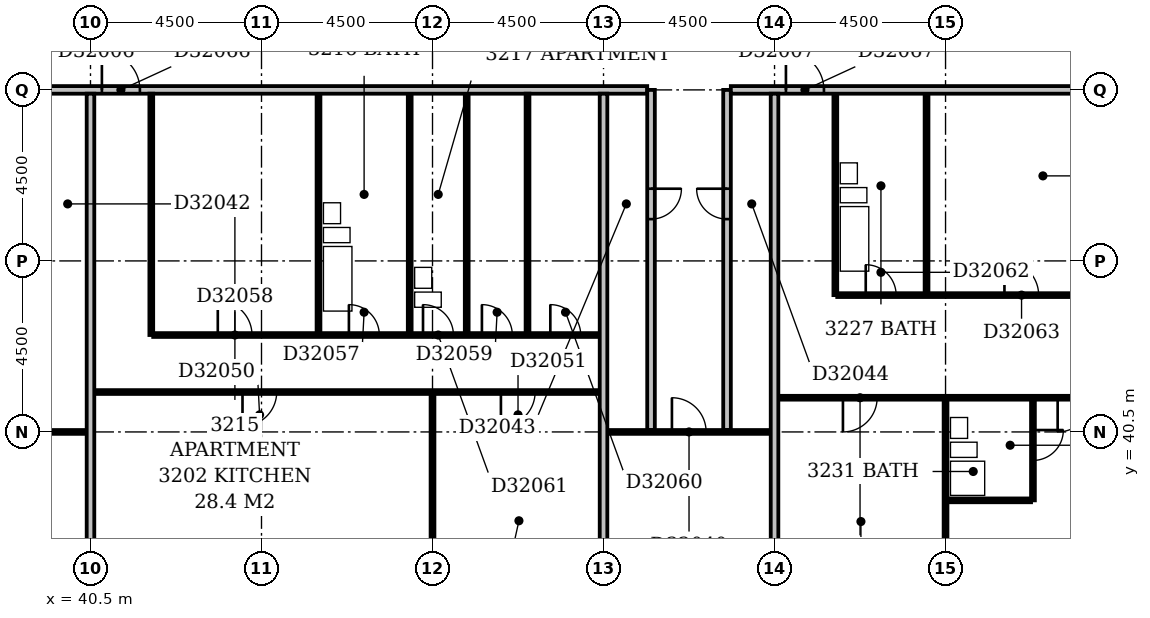
"""IFC4 building model, lengths in metres.
Left out: names, types, materials, properties, quantities, classifications, styles, units other than length and angle.
Written with IfcOpenShell. Run it as: python <this file> out.ifc"""

import sys

from ifc_helpers import new_model, si_unit, direction, frame, frame_2d, origin, place, context, subcontext, project, spatial, rectangle, extrude, element, fill, save


model = new_model("IFC4")
c1 = context("Model", 3, precision=1e-05, world=origin(), true_north=direction((0.0, 1.0)))
c2 = subcontext(c1, "Body", "Model", "MODEL_VIEW")
j1 = project(units=[si_unit("LENGTHUNIT", "METRE"), si_unit("PLANEANGLEUNIT", "RADIAN")], contexts=[c1])
p1 = place(None, origin())
s1 = spatial("IfcSite", under=j1, at=p1, CompositionType="ELEMENT")
p2 = place(p1, origin())
s2 = spatial("IfcBuilding", under=s1, at=p2, CompositionType="ELEMENT")
p3 = place(p2, frame((0.0, 0.0, 130.4)))
s3 = spatial("IfcBuildingStorey", under=s2, at=p3, CompositionType="ELEMENT", Elevation=130.4)
p4 = place(p3, frame((40.5, 36.5, 0.0), z_axis=(0.0, 0.0, 1.0), x_axis=(0.0, 1.0, 0.0)))
e1 = element("IfcWall", 1, at=p4, inside=s3, PredefinedType="PARTITIONING", context=c2, shape_type="SweptSolid", body=[
    extrude(rectangle(XDim=12.9, YDim=0.2, at=frame_2d((6.45, 0.0))), origin(), (0.0, 0.0, 1.0), 3.3),
])
p5 = place(p3, frame((49.5, 36.5, 0.0), z_axis=(0.0, 0.0, 1.0), x_axis=(0.0, 1.0, 0.0)))
e2 = element("IfcWall", 2, at=p5, inside=s3, PredefinedType="PARTITIONING", context=c2, shape_type="SweptSolid", body=[
    extrude(rectangle(XDim=5.0, YDim=0.1, at=frame_2d((2.5, 0.0))), origin(), (0.0, 0.0, 1.0), 3.3),
])
p6 = place(p3, frame((54.0, 36.5, 0.0), z_axis=(0.0, 0.0, 1.0), x_axis=(0.0, 1.0, 0.0)))
e3 = element("IfcWall", 3, at=p6, inside=s3, PredefinedType="PARTITIONING", context=c2, shape_type="SweptSolid", body=[
    extrude(rectangle(XDim=12.9, YDim=0.2, at=frame_2d((6.45, 0.0))), origin(), (0.0, 0.0, 1.0), 2.6),
])
p7 = place(p3, frame((58.5, 36.5, 0.0), z_axis=(0.0, 0.0, 1.0), x_axis=(0.0, 1.0, 0.0)))
e4 = element("IfcWall", 4, at=p7, inside=s3, PredefinedType="PARTITIONING", context=c2, shape_type="SweptSolid", body=[
    extrude(rectangle(XDim=12.9, YDim=0.2, at=frame_2d((6.45, 0.0))), origin(), (0.0, 0.0, 1.0), 3.3),
])
p8 = place(p3, frame((63.0, 36.5, 0.0), z_axis=(0.0, 0.0, 1.0), x_axis=(0.0, 1.0, 0.0)))
e5 = element("IfcWall", 5, at=p8, inside=s3, PredefinedType="PARTITIONING", context=c2, shape_type="SweptSolid", body=[
    extrude(rectangle(XDim=4.85, YDim=0.1, at=frame_2d((2.425, 0.0))), origin(), (0.0, 0.0, 1.0), 2.4),
])
p9 = place(p3, frame((63.05, 38.7, 0.0), z_axis=(0.0, 0.0, 1.0), x_axis=(1.0, 0.0, 0.0)))
e6 = element("IfcWall", 6, at=p9, inside=s3, PredefinedType="PLUMBINGWALL", context=c2, shape_type="SweptSolid", body=[
    extrude(rectangle(XDim=2.2, YDim=0.1, at=frame_2d((1.1, 0.0))), origin(), (0.0, 0.0, 1.0), 3.3),
])
p10 = place(p3, frame((65.3, 38.7, 0.0), z_axis=(0.0, 0.0, 1.0), x_axis=(0.0, 1.0, 0.0)))
e7 = element("IfcWall", 7, at=p10, inside=s3, PredefinedType="PLUMBINGWALL", context=c2, shape_type="SweptSolid", body=[
    extrude(rectangle(XDim=2.65, YDim=0.1, at=frame_2d((1.325, 0.0))), origin(), (0.0, 0.0, 1.0), 3.3),
])
p11 = place(p10, frame((1.05, 0.0, 0.0)))
e8 = element("IfcOpeningElement", 8, at=p11, cuts=e7, PredefinedType="OPENING", context=c2, shape_type="SweptSolid", body=[
    extrude(rectangle(XDim=0.8, YDim=2.1, at=frame_2d((0.4, 1.05))), frame((0.0, 0.062, 0.0), z_axis=(0.0, -1.0, 0.0), x_axis=(1.0, 0.0, 0.0)), (0.0, 0.0, 1.0), 0.124),
])
p12 = place(p3, frame((36.1, 40.5, 0.0), z_axis=(0.0, 0.0, 1.0), x_axis=(1.0, 0.0, 0.0)))
e9 = element("IfcWall", 9, at=p12, inside=s3, PredefinedType="PARTITIONING", context=c2, shape_type="SweptSolid", body=[
    extrude(rectangle(XDim=4.3, YDim=0.1, at=frame_2d((2.15, 0.0))), origin(), (0.0, 0.0, 1.0), 3.3),
])
p13 = place(p12, frame((1.7, 0.0, 0.0)))
e10 = element("IfcOpeningElement", 10, at=p13, cuts=e9, PredefinedType="OPENING", context=c2, shape_type="SweptSolid", body=[
    extrude(rectangle(XDim=0.9, YDim=2.1, at=frame_2d((0.45, 1.05))), frame((0.0, 0.062, 0.0), z_axis=(0.0, -1.0, 0.0), x_axis=(1.0, 0.0, 0.0)), (0.0, 0.0, 1.0), 0.124),
])
p14 = place(p3, frame((54.1, 40.5, 0.0), z_axis=(0.0, 0.0, 1.0), x_axis=(1.0, 0.0, 0.0)))
e11 = element("IfcWall", 11, at=p14, inside=s3, PredefinedType="PARTITIONING", context=c2, shape_type="SweptSolid", body=[
    extrude(rectangle(XDim=4.3, YDim=0.1, at=frame_2d((2.15, 0.0))), origin(), (0.0, 0.0, 1.0), 3.3),
])
p15 = place(p14, frame((1.7, 0.0, 0.0)))
e12 = element("IfcOpeningElement", 12, at=p15, cuts=e11, PredefinedType="OPENING", context=c2, shape_type="SweptSolid", body=[
    extrude(rectangle(XDim=0.9, YDim=2.1, at=frame_2d((0.45, 1.05))), frame((0.0, 0.062, 0.0), z_axis=(0.0, -1.0, 0.0), x_axis=(1.0, 0.0, 0.0)), (0.0, 0.0, 1.0), 0.124),
])
p16 = place(p3, frame((55.25, 40.55, 0.0), z_axis=(0.0, 0.0, 1.0), x_axis=(0.0, 1.0, 0.0)))
e13 = element("IfcWall", 13, at=p16, inside=s3, PredefinedType="PARTITIONING", context=c2, shape_type="SweptSolid", body=[
    extrude(rectangle(XDim=8.95, YDim=0.2, at=frame_2d((4.475, 0.0))), origin(), (0.0, 0.0, 1.0), 3.3),
])
p17 = place(p16, frame((5.55, 0.0, 0.0)))
e14 = element("IfcOpeningElement", 14, at=p17, cuts=e13, PredefinedType="OPENING", context=c2, shape_type="SweptSolid", body=[
    extrude(rectangle(XDim=0.8, YDim=2.1, at=frame_2d((0.4, 1.05))), frame((0.0, 0.112, 0.0), z_axis=(0.0, -1.0, 0.0), x_axis=(1.0, 0.0, 0.0)), (0.0, 0.0, 1.0), 0.224),
])
p18 = place(p3, frame((57.25, 40.55, 0.0), z_axis=(0.0, 0.0, 1.0), x_axis=(0.0, 1.0, 0.0)))
e15 = element("IfcWall", 15, at=p18, inside=s3, PredefinedType="PARTITIONING", context=c2, shape_type="SweptSolid", body=[
    extrude(rectangle(XDim=8.95, YDim=0.2, at=frame_2d((4.475, 0.0))), origin(), (0.0, 0.0, 1.0), 3.3),
])
p19 = place(p18, frame((5.55, 0.0, 0.0)))
e16 = element("IfcOpeningElement", 16, at=p19, cuts=e15, PredefinedType="OPENING", context=c2, shape_type="SweptSolid", body=[
    extrude(rectangle(XDim=0.8, YDim=2.1, at=frame_2d((0.4, 1.05))), frame((0.0, 0.112, 0.0), z_axis=(0.0, -1.0, 0.0), x_axis=(1.0, 0.0, 0.0)), (0.0, 0.0, 1.0), 0.224),
])
p20 = place(p3, frame((58.6, 41.4, 0.0), z_axis=(0.0, 0.0, 1.0), x_axis=(1.0, 0.0, 0.0)))
e17 = element("IfcWall", 17, at=p20, inside=s3, PredefinedType="PARTITIONING", context=c2, shape_type="SweptSolid", body=[
    extrude(rectangle(XDim=9.5, YDim=0.1, at=frame_2d((4.75, 0.0))), origin(), (0.0, 0.0, 1.0), 3.3),
])
p21 = place(p20, frame((1.7, 0.0, 0.0)))
e18 = element("IfcOpeningElement", 18, at=p21, cuts=e17, PredefinedType="OPENING", context=c2, shape_type="SweptSolid", body=[
    extrude(rectangle(XDim=0.9, YDim=2.1, at=frame_2d((0.45, 1.05))), frame((0.0, 0.062, 0.0), z_axis=(0.0, -1.0, 0.0), x_axis=(1.0, 0.0, 0.0)), (0.0, 0.0, 1.0), 0.124),
])
p22 = place(p20, frame((7.35, 0.0, 0.0)))
e19 = element("IfcOpeningElement", 19, at=p22, cuts=e17, PredefinedType="OPENING", context=c2, shape_type="SweptSolid", body=[
    extrude(rectangle(XDim=0.9, YDim=2.1, at=frame_2d((0.45, 1.05))), frame((0.0, 0.062, 0.0), z_axis=(0.0, -1.0, 0.0), x_axis=(1.0, 0.0, 0.0)), (0.0, 0.0, 1.0), 0.124),
])
p23 = place(p3, frame((40.6, 41.55, 0.0), z_axis=(0.0, 0.0, 1.0), x_axis=(1.0, 0.0, 0.0)))
e20 = element("IfcWall", 20, at=p23, inside=s3, PredefinedType="PARTITIONING", context=c2, shape_type="SweptSolid", body=[
    extrude(rectangle(XDim=13.3, YDim=0.1, at=frame_2d((6.65, 0.0))), origin(), (0.0, 0.0, 1.0), 3.3),
])
p24 = place(p23, frame((3.9, 0.0, 0.0)))
e21 = element("IfcOpeningElement", 21, at=p24, cuts=e20, PredefinedType="OPENING", context=c2, shape_type="SweptSolid", body=[
    extrude(rectangle(XDim=0.9, YDim=2.1, at=frame_2d((0.45, 1.05))), frame((0.0, 0.062, 0.0), z_axis=(0.0, -1.0, 0.0), x_axis=(1.0, 0.0, 0.0)), (0.0, 0.0, 1.0), 0.124),
])
p25 = place(p23, frame((10.7, 0.0, 0.0)))
e22 = element("IfcOpeningElement", 22, at=p25, cuts=e20, PredefinedType="OPENING", context=c2, shape_type="SweptSolid", body=[
    extrude(rectangle(XDim=0.9, YDim=2.1, at=frame_2d((0.45, 1.05))), frame((0.0, 0.062, 0.0), z_axis=(0.0, -1.0, 0.0), x_axis=(1.0, 0.0, 0.0)), (0.0, 0.0, 1.0), 0.124),
])
p26 = place(p3, frame((42.1, 43.05, 0.0), z_axis=(0.0, 0.0, 1.0), x_axis=(0.0, 1.0, 0.0)))
e23 = element("IfcWall", 23, at=p26, inside=s3, PredefinedType="PARTITIONING", context=c2, shape_type="SweptSolid", body=[
    extrude(rectangle(XDim=6.35, YDim=0.1, at=frame_2d((3.175, 0.0))), origin(), (0.0, 0.0, 1.0), 3.3),
])
p27 = place(p3, frame((42.15, 43.05, 0.0), z_axis=(0.0, 0.0, 1.0), x_axis=(1.0, 0.0, 0.0)))
e24 = element("IfcWall", 24, at=p27, inside=s3, PredefinedType="PARTITIONING", context=c2, shape_type="SweptSolid", body=[
    extrude(rectangle(XDim=11.75, YDim=0.1, at=frame_2d((5.875, 0.0))), origin(), (0.0, 0.0, 1.0), 3.3),
])
p28 = place(p27, frame((5.15, 0.0, 0.0)))
e25 = element("IfcOpeningElement", 25, at=p28, cuts=e24, PredefinedType="OPENING", context=c2, shape_type="SweptSolid", body=[
    extrude(rectangle(XDim=0.8, YDim=2.1, at=frame_2d((0.4, 1.05))), frame((0.0, 0.062, 0.0), z_axis=(0.0, -1.0, 0.0), x_axis=(1.0, 0.0, 0.0)), (0.0, 0.0, 1.0), 0.124),
])
p29 = place(p27, frame((1.7, 0.0, 0.0)))
e26 = element("IfcOpeningElement", 26, at=p29, cuts=e24, PredefinedType="OPENING", context=c2, shape_type="SweptSolid", body=[
    extrude(rectangle(XDim=0.9, YDim=2.1, at=frame_2d((0.45, 1.05))), frame((0.0, 0.062, 0.0), z_axis=(0.0, -1.0, 0.0), x_axis=(1.0, 0.0, 0.0)), (0.0, 0.0, 1.0), 0.124),
])
p30 = place(p27, frame((8.65, 0.0, 0.0)))
e27 = element("IfcOpeningElement", 27, at=p30, cuts=e24, PredefinedType="OPENING", context=c2, shape_type="SweptSolid", body=[
    extrude(rectangle(XDim=0.8, YDim=2.1, at=frame_2d((0.4, 1.05))), frame((0.0, 0.062, 0.0), z_axis=(0.0, -1.0, 0.0), x_axis=(1.0, 0.0, 0.0)), (0.0, 0.0, 1.0), 0.124),
])
p31 = place(p27, frame((10.45, 0.0, 0.0)))
e28 = element("IfcOpeningElement", 28, at=p31, cuts=e24, PredefinedType="OPENING", context=c2, shape_type="SweptSolid", body=[
    extrude(rectangle(XDim=0.8, YDim=2.1, at=frame_2d((0.4, 1.05))), frame((0.0, 0.062, 0.0), z_axis=(0.0, -1.0, 0.0), x_axis=(1.0, 0.0, 0.0)), (0.0, 0.0, 1.0), 0.124),
])
p32 = place(p27, frame((7.1, 0.0, 0.0)))
e29 = element("IfcOpeningElement", 29, at=p32, cuts=e24, PredefinedType="OPENING", context=c2, shape_type="SweptSolid", body=[
    extrude(rectangle(XDim=0.8, YDim=2.1, at=frame_2d((0.4, 1.05))), frame((0.0, 0.062, 0.0), z_axis=(0.0, -1.0, 0.0), x_axis=(1.0, 0.0, 0.0)), (0.0, 0.0, 1.0), 0.124),
])
for number, where, z_axis, x_axis in (
    (30, (46.5, 43.1, 0.0), (0.0, 0.0, 1.0), (0.0, 1.0, 0.0)),
    (31, (48.9, 43.1, 0.0), (0.0, 0.0, 1.0), (0.0, 1.0, 0.0)),
    (32, (50.4, 43.1, 0.0), (0.0, 0.0, 1.0), (0.0, 1.0, 0.0)),
):
    element("IfcWall", number, at=place(p3, frame(where, z_axis=z_axis, x_axis=x_axis)), inside=s3, PredefinedType="PLUMBINGWALL", context=c2, shape_type="SweptSolid", body=[
        extrude(rectangle(XDim=6.3, YDim=0.1, at=frame_2d((3.15, 0.0))), origin(), (0.0, 0.0, 1.0), 3.3),
    ])
p33 = place(p3, frame((52.0, 43.1, 0.0), z_axis=(0.0, 0.0, 1.0), x_axis=(0.0, 1.0, 0.0)))
e33 = element("IfcWall", 33, at=p33, inside=s3, PredefinedType="PARTITIONING", context=c2, shape_type="SweptSolid", body=[
    extrude(rectangle(XDim=6.3, YDim=0.1, at=frame_2d((3.15, 0.0))), origin(), (0.0, 0.0, 1.0), 3.3),
])
p34 = place(p3, frame((60.1, 44.1, 0.0), z_axis=(0.0, 0.0, 1.0), x_axis=(0.0, 1.0, 0.0)))
e34 = element("IfcWall", 34, at=p34, inside=s3, PredefinedType="PLUMBINGWALL", context=c2, shape_type="SweptSolid", body=[
    extrude(rectangle(XDim=5.3, YDim=0.1, at=frame_2d((2.65, 0.0))), origin(), (0.0, 0.0, 1.0), 3.3),
])
p35 = place(p3, frame((60.15, 44.1, 0.0), z_axis=(0.0, 0.0, 1.0), x_axis=(1.0, 0.0, 0.0)))
e35 = element("IfcWall", 35, at=p35, inside=s3, PredefinedType="PARTITIONING", context=c2, shape_type="SweptSolid", body=[
    extrude(rectangle(XDim=7.95, YDim=0.1, at=frame_2d((3.975, 0.0))), origin(), (0.0, 0.0, 1.0), 3.3),
])
p36 = place(p35, frame((0.75, 0.0, 0.0)))
e36 = element("IfcOpeningElement", 36, at=p36, cuts=e35, PredefinedType="OPENING", context=c2, shape_type="SweptSolid", body=[
    extrude(rectangle(XDim=0.8, YDim=2.1, at=frame_2d((0.4, 1.05))), frame((0.0, 0.062, 0.0), z_axis=(0.0, -1.0, 0.0), x_axis=(1.0, 0.0, 0.0)), (0.0, 0.0, 1.0), 0.124),
])
p37 = place(p35, frame((4.4, 0.0, 0.0)))
e37 = element("IfcOpeningElement", 37, at=p37, cuts=e35, PredefinedType="OPENING", context=c2, shape_type="SweptSolid", body=[
    extrude(rectangle(XDim=0.9, YDim=2.1, at=frame_2d((0.45, 1.05))), frame((0.0, 0.062, 0.0), z_axis=(0.0, -1.0, 0.0), x_axis=(1.0, 0.0, 0.0)), (0.0, 0.0, 1.0), 0.124),
])
p38 = place(p3, frame((62.5, 44.15, 0.0), z_axis=(0.0, 0.0, 1.0), x_axis=(0.0, 1.0, 0.0)))
e38 = element("IfcWall", 38, at=p38, inside=s3, PredefinedType="PLUMBINGWALL", context=c2, shape_type="SweptSolid", body=[
    extrude(rectangle(XDim=5.25, YDim=0.1, at=frame_2d((2.625, 0.0))), origin(), (0.0, 0.0, 1.0), 2.4),
])
p39 = place(p3, frame((39.35, 49.5, 0.0), z_axis=(0.0, 0.0, 1.0), x_axis=(1.0, 0.0, 0.0)))
e39 = element("IfcWall", 39, at=p39, inside=s3, PredefinedType="PARTITIONING", context=c2, shape_type="SweptSolid", body=[
    extrude(rectangle(XDim=15.8, YDim=0.2, at=frame_2d((7.9, 0.0))), origin(), (0.0, 0.0, 1.0), 3.3),
])
p40 = place(p39, frame((1.45, 0.0, 0.0)))
e40 = element("IfcOpeningElement", 40, at=p40, cuts=e39, PredefinedType="OPENING", context=c2, shape_type="SweptSolid", body=[
    extrude(rectangle(XDim=1.0, YDim=2.1, at=frame_2d((0.5, 1.05))), frame((0.0, 0.112, 0.0), z_axis=(0.0, -1.0, 0.0), x_axis=(1.0, 0.0, 0.0)), (0.0, 0.0, 1.0), 0.224),
])
p41 = place(p3, frame((57.35, 49.5, 0.0), z_axis=(0.0, 0.0, 1.0), x_axis=(1.0, 0.0, 0.0)))
e41 = element("IfcWall", 41, at=p41, inside=s3, PredefinedType="PARTITIONING", context=c2, shape_type="SweptSolid", body=[
    extrude(rectangle(XDim=9.65, YDim=0.2, at=frame_2d((4.825, 0.0))), origin(), (0.0, 0.0, 1.0), 3.3),
])
p42 = place(p41, frame((1.45, 0.0, 0.0)))
e42 = element("IfcOpeningElement", 42, at=p42, cuts=e41, PredefinedType="OPENING", context=c2, shape_type="SweptSolid", body=[
    extrude(rectangle(XDim=1.0, YDim=2.1, at=frame_2d((0.5, 1.05))), frame((0.0, 0.112, 0.0), z_axis=(0.0, -1.0, 0.0), x_axis=(1.0, 0.0, 0.0)), (0.0, 0.0, 1.0), 0.224),
])
p43 = place(p11, origin())
e43 = element("IfcDoor", 43, at=p43, inside=s3, OperationType="SINGLE_SWING_RIGHT", PredefinedType="DOOR", context=c2, shape_type="SweptSolid", body=[
    extrude(rectangle(XDim=0.8, YDim=2.1, at=frame_2d((0.4, 1.05))), frame((0.0, 0.025, 0.0), z_axis=(0.0, -1.0, 0.0), x_axis=(1.0, 0.0, 0.0)), (0.0, 0.0, 1.0), 0.05),
])
fill(e8, e43)
p44 = place(p15, origin())
e44 = element("IfcDoor", 44, at=p44, inside=s3, OperationType="SINGLE_SWING_LEFT", PredefinedType="DOOR", context=c2, shape_type="SweptSolid", body=[
    extrude(rectangle(XDim=0.9, YDim=2.1, at=frame_2d((0.45, 1.05))), frame((0.0, 0.025, 0.0), z_axis=(0.0, -1.0, 0.0), x_axis=(1.0, 0.0, 0.0)), (0.0, 0.0, 1.0), 0.05),
])
fill(e12, e44)
p45 = place(p17, origin())
e45 = element("IfcDoor", 45, at=p45, inside=s3, OperationType="SINGLE_SWING_RIGHT", PredefinedType="DOOR", context=c2, shape_type="SweptSolid", body=[
    extrude(rectangle(XDim=0.8, YDim=2.1, at=frame_2d((0.4, 1.05))), frame((0.0, 0.025, 0.0), z_axis=(0.0, -1.0, 0.0), x_axis=(1.0, 0.0, 0.0)), (0.0, 0.0, 1.0), 0.05),
])
fill(e14, e45)
p46 = place(p19, frame((0.8, 0.0, 0.0), z_axis=(0.0, 0.0, 1.0), x_axis=(-1.0, 0.0, 0.0)))
e46 = element("IfcDoor", 46, at=p46, inside=s3, OperationType="SINGLE_SWING_LEFT", PredefinedType="DOOR", context=c2, shape_type="SweptSolid", body=[
    extrude(rectangle(XDim=0.8, YDim=2.1, at=frame_2d((0.4, 1.05))), frame((0.0, 0.025, 0.0), z_axis=(0.0, -1.0, 0.0), x_axis=(1.0, 0.0, 0.0)), (0.0, 0.0, 1.0), 0.05),
])
fill(e16, e46)
p47 = place(p21, frame((0.9, 0.0, 0.0), z_axis=(0.0, 0.0, 1.0), x_axis=(-1.0, 0.0, 0.0)))
e47 = element("IfcDoor", 47, at=p47, inside=s3, OperationType="SINGLE_SWING_RIGHT", PredefinedType="DOOR", context=c2, shape_type="SweptSolid", body=[
    extrude(rectangle(XDim=0.9, YDim=2.1, at=frame_2d((0.45, 1.05))), frame((0.0, 0.025, 0.0), z_axis=(0.0, -1.0, 0.0), x_axis=(1.0, 0.0, 0.0)), (0.0, 0.0, 1.0), 0.05),
])
fill(e18, e47)
p48 = place(p22, frame((0.9, 0.0, 0.0), z_axis=(0.0, 0.0, 1.0), x_axis=(-1.0, 0.0, 0.0)))
e48 = element("IfcDoor", 48, at=p48, inside=s3, OperationType="SINGLE_SWING_RIGHT", PredefinedType="DOOR", context=c2, shape_type="SweptSolid", body=[
    extrude(rectangle(XDim=0.9, YDim=2.1, at=frame_2d((0.45, 1.05))), frame((0.0, 0.025, 0.0), z_axis=(0.0, -1.0, 0.0), x_axis=(1.0, 0.0, 0.0)), (0.0, 0.0, 1.0), 0.05),
])
fill(e19, e48)
p49 = place(p24, frame((0.9, 0.0, 0.0), z_axis=(0.0, 0.0, 1.0), x_axis=(-1.0, 0.0, 0.0)))
e49 = element("IfcDoor", 49, at=p49, inside=s3, OperationType="SINGLE_SWING_RIGHT", PredefinedType="DOOR", context=c2, shape_type="SweptSolid", body=[
    extrude(rectangle(XDim=0.9, YDim=2.1, at=frame_2d((0.45, 1.05))), frame((0.0, 0.025, 0.0), z_axis=(0.0, -1.0, 0.0), x_axis=(1.0, 0.0, 0.0)), (0.0, 0.0, 1.0), 0.05),
])
fill(e21, e49)
p50 = place(p25, frame((0.9, 0.0, 0.0), z_axis=(0.0, 0.0, 1.0), x_axis=(-1.0, 0.0, 0.0)))
e50 = element("IfcDoor", 50, at=p50, inside=s3, OperationType="SINGLE_SWING_RIGHT", PredefinedType="DOOR", context=c2, shape_type="SweptSolid", body=[
    extrude(rectangle(XDim=0.9, YDim=2.1, at=frame_2d((0.45, 1.05))), frame((0.0, 0.025, 0.0), z_axis=(0.0, -1.0, 0.0), x_axis=(1.0, 0.0, 0.0)), (0.0, 0.0, 1.0), 0.05),
])
fill(e22, e50)
p51 = place(p28, origin())
e51 = element("IfcDoor", 51, at=p51, inside=s3, OperationType="SINGLE_SWING_LEFT", PredefinedType="DOOR", context=c2, shape_type="SweptSolid", body=[
    extrude(rectangle(XDim=0.8, YDim=2.1, at=frame_2d((0.4, 1.05))), frame((0.0, 0.025, 0.0), z_axis=(0.0, -1.0, 0.0), x_axis=(1.0, 0.0, 0.0)), (0.0, 0.0, 1.0), 0.05),
])
fill(e25, e51)
p52 = place(p29, origin())
e52 = element("IfcDoor", 52, at=p52, inside=s3, OperationType="SINGLE_SWING_LEFT", PredefinedType="DOOR", context=c2, shape_type="SweptSolid", body=[
    extrude(rectangle(XDim=0.9, YDim=2.1, at=frame_2d((0.45, 1.05))), frame((0.0, 0.025, 0.0), z_axis=(0.0, -1.0, 0.0), x_axis=(1.0, 0.0, 0.0)), (0.0, 0.0, 1.0), 0.05),
])
fill(e26, e52)
p53 = place(p30, origin())
e53 = element("IfcDoor", 53, at=p53, inside=s3, OperationType="SINGLE_SWING_LEFT", PredefinedType="DOOR", context=c2, shape_type="SweptSolid", body=[
    extrude(rectangle(XDim=0.8, YDim=2.1, at=frame_2d((0.4, 1.05))), frame((0.0, 0.025, 0.0), z_axis=(0.0, -1.0, 0.0), x_axis=(1.0, 0.0, 0.0)), (0.0, 0.0, 1.0), 0.05),
])
fill(e27, e53)
p54 = place(p31, origin())
e54 = element("IfcDoor", 54, at=p54, inside=s3, OperationType="SINGLE_SWING_LEFT", PredefinedType="DOOR", context=c2, shape_type="SweptSolid", body=[
    extrude(rectangle(XDim=0.8, YDim=2.1, at=frame_2d((0.4, 1.05))), frame((0.0, 0.025, 0.0), z_axis=(0.0, -1.0, 0.0), x_axis=(1.0, 0.0, 0.0)), (0.0, 0.0, 1.0), 0.05),
])
fill(e28, e54)
p55 = place(p32, origin())
e55 = element("IfcDoor", 55, at=p55, inside=s3, OperationType="SINGLE_SWING_LEFT", PredefinedType="DOOR", context=c2, shape_type="SweptSolid", body=[
    extrude(rectangle(XDim=0.8, YDim=2.1, at=frame_2d((0.4, 1.05))), frame((0.0, 0.025, 0.0), z_axis=(0.0, -1.0, 0.0), x_axis=(1.0, 0.0, 0.0)), (0.0, 0.0, 1.0), 0.05),
])
fill(e29, e55)
p56 = place(p36, origin())
e56 = element("IfcDoor", 56, at=p56, inside=s3, OperationType="SINGLE_SWING_LEFT", PredefinedType="DOOR", context=c2, shape_type="SweptSolid", body=[
    extrude(rectangle(XDim=0.8, YDim=2.1, at=frame_2d((0.4, 1.05))), frame((0.0, 0.025, 0.0), z_axis=(0.0, -1.0, 0.0), x_axis=(1.0, 0.0, 0.0)), (0.0, 0.0, 1.0), 0.05),
])
fill(e36, e56)
p57 = place(p37, origin())
e57 = element("IfcDoor", 57, at=p57, inside=s3, OperationType="SINGLE_SWING_LEFT", PredefinedType="DOOR", context=c2, shape_type="SweptSolid", body=[
    extrude(rectangle(XDim=0.9, YDim=2.1, at=frame_2d((0.45, 1.05))), frame((0.0, 0.025, 0.0), z_axis=(0.0, -1.0, 0.0), x_axis=(1.0, 0.0, 0.0)), (0.0, 0.0, 1.0), 0.05),
])
fill(e37, e57)
p58 = place(p40, origin())
e58 = element("IfcDoor", 58, at=p58, inside=s3, OperationType="SINGLE_SWING_LEFT", PredefinedType="DOOR", context=c2, shape_type="SweptSolid", body=[
    extrude(rectangle(XDim=1.0, YDim=2.1, at=frame_2d((0.5, 1.05))), frame((0.0, 0.025, 0.0), z_axis=(0.0, -1.0, 0.0), x_axis=(1.0, 0.0, 0.0)), (0.0, 0.0, 1.0), 0.05),
])
fill(e40, e58)
p59 = place(p42, origin())
e59 = element("IfcDoor", 59, at=p59, inside=s3, OperationType="SINGLE_SWING_LEFT", PredefinedType="DOOR", context=c2, shape_type="SweptSolid", body=[
    extrude(rectangle(XDim=1.0, YDim=2.1, at=frame_2d((0.5, 1.05))), frame((0.0, 0.025, 0.0), z_axis=(0.0, -1.0, 0.0), x_axis=(1.0, 0.0, 0.0)), (0.0, 0.0, 1.0), 0.05),
])
fill(e42, e59)
save(model, sys.argv[1])
